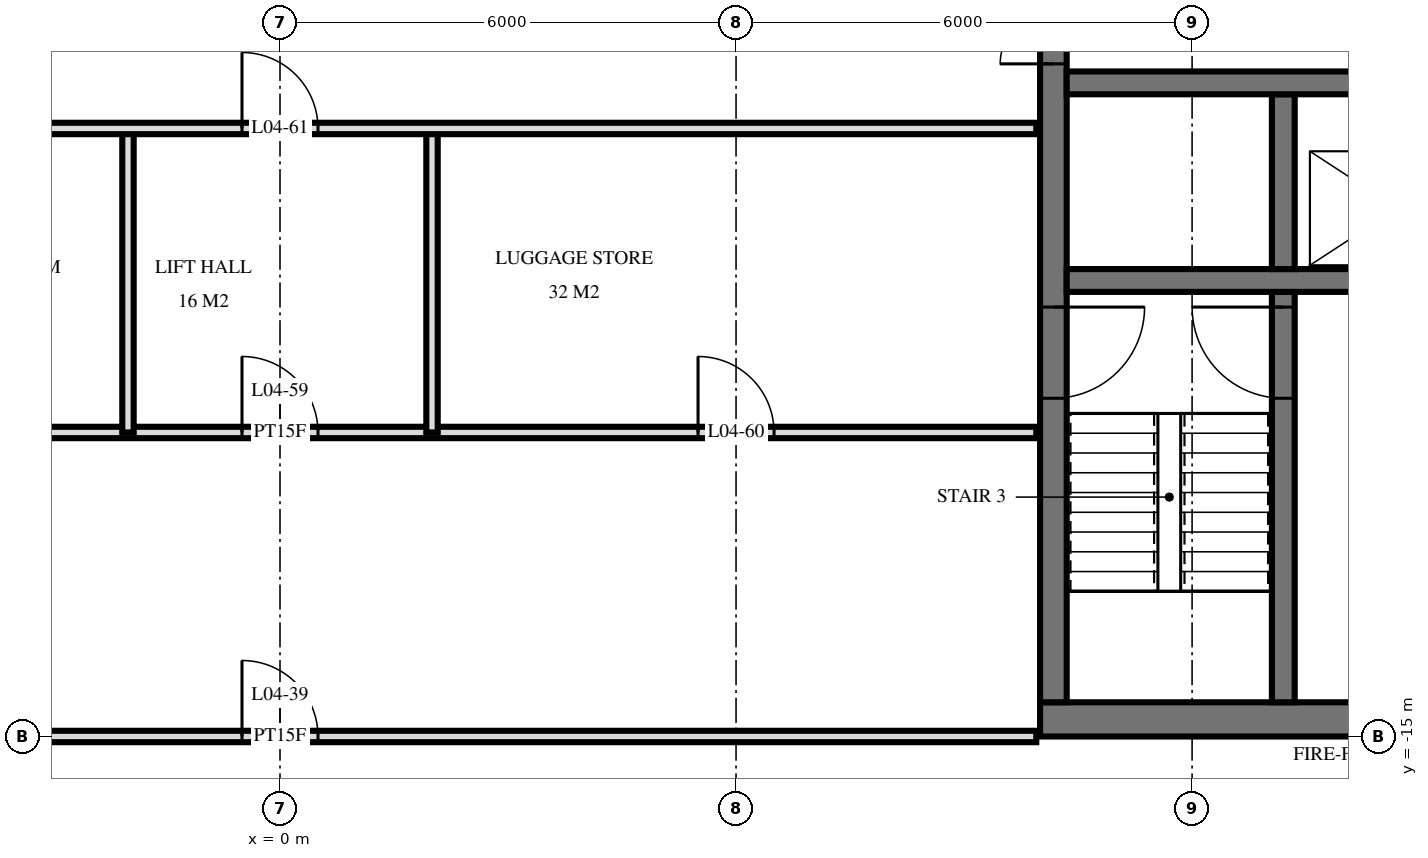
"""IFC4 building model, lengths in metres.
Left out: names, types, materials, properties, quantities, classifications, styles, units other than length and angle.
Written with IfcOpenShell. Run it as: python <this file> out.ifc"""

import sys

from ifc_helpers import new_model, si_unit, direction, frame, frame_2d, origin, place, context, subcontext, project, spatial, rectangle, extrude, element, fill, save


model = new_model("IFC4")
c1 = context("Model", 3, precision=1e-05, world=origin(), true_north=direction((0.0, 1.0)))
c2 = subcontext(c1, "Body", "Model", "MODEL_VIEW")
j1 = project(units=[si_unit("LENGTHUNIT", "METRE"), si_unit("PLANEANGLEUNIT", "RADIAN")], contexts=[c1])
p1 = place(None, origin())
s1 = spatial("IfcSite", under=j1, at=p1, CompositionType="ELEMENT")
p2 = place(p1, origin())
s2 = spatial("IfcBuilding", under=s1, at=p2, CompositionType="ELEMENT")
p3 = place(p2, frame((0.0, 0.0, 24.0)))
s3 = spatial("IfcBuildingStorey", under=s2, at=p3, CompositionType="ELEMENT", Elevation=24.0)
p4 = place(p3, frame((10.0, -14.775, 0.0), z_axis=(0.0, 0.0, 1.0), x_axis=(1.0, 0.0, 0.0)))
e1 = element("IfcWall", 1, at=p4, inside=s3, PredefinedType="SHEAR", context=c2, shape_type="SweptSolid", body=[
    extrude(rectangle(XDim=19.5, YDim=0.45, at=frame_2d((9.75, 0.0))), origin(), (0.0, 0.0, 1.0), 3.6),
])
p5 = place(p4, frame((7.1, 0.0, 0.0)))
e2 = element("IfcOpeningElement", 2, at=p5, cuts=e1, PredefinedType="OPENING", context=c2, shape_type="SweptSolid", body=[
    extrude(rectangle(XDim=1.2, YDim=2.1, at=frame_2d((0.6, 1.05))), frame((0.0, 0.235, 0.0), z_axis=(0.0, -1.0, 0.0), x_axis=(1.0, 0.0, 0.0)), (0.0, 0.0, 1.0), 0.47),
])
p6 = place(p4, frame((4.15, 0.0, 0.0)))
e3 = element("IfcOpeningElement", 3, at=p6, cuts=e1, PredefinedType="OPENING", context=c2, shape_type="SweptSolid", body=[
    extrude(rectangle(XDim=1.1, YDim=2.1, at=frame_2d((0.55, 1.05))), frame((0.0, 0.235, 0.0), z_axis=(0.0, -1.0, 0.0), x_axis=(1.0, 0.0, 0.0)), (0.0, 0.0, 1.0), 0.47),
])
p7 = place(p4, frame((10.1, 0.0, 0.0)))
e4 = element("IfcOpeningElement", 4, at=p7, cuts=e1, PredefinedType="OPENING", context=c2, shape_type="SweptSolid", body=[
    extrude(rectangle(XDim=0.9, YDim=2.1, at=frame_2d((0.45, 1.05))), frame((0.0, 0.235, 0.0), z_axis=(0.0, -1.0, 0.0), x_axis=(1.0, 0.0, 0.0)), (0.0, 0.0, 1.0), 0.47),
])
p8 = place(p4, frame((12.45, 0.0, 0.0)))
e5 = element("IfcOpeningElement", 5, at=p8, cuts=e1, PredefinedType="OPENING", context=c2, shape_type="SweptSolid", body=[
    extrude(rectangle(XDim=1.0, YDim=2.1, at=frame_2d((0.5, 1.05))), frame((0.0, 0.235, 0.0), z_axis=(0.0, -1.0, 0.0), x_axis=(1.0, 0.0, 0.0)), (0.0, 0.0, 1.0), 0.47),
])
p9 = place(p4, frame((16.25, 0.0, 0.0)))
e6 = element("IfcOpeningElement", 6, at=p9, cuts=e1, PredefinedType="OPENING", context=c2, shape_type="SweptSolid", body=[
    extrude(rectangle(XDim=1.0, YDim=2.1, at=frame_2d((0.5, 1.05))), frame((0.0, 0.235, 0.0), z_axis=(0.0, -1.0, 0.0), x_axis=(1.0, 0.0, 0.0)), (0.0, 0.0, 1.0), 0.47),
])
p10 = place(p3, frame((10.175, -14.55, 0.0), z_axis=(0.0, 0.0, 1.0), x_axis=(0.0, 1.0, 0.0)))
e7 = element("IfcWall", 7, at=p10, inside=s3, PredefinedType="SHEAR", context=c2, shape_type="SweptSolid", body=[
    extrude(rectangle(XDim=14.1, YDim=0.35, at=frame_2d((7.05, 0.0))), origin(), (0.0, 0.0, 1.0), 3.6),
])
p11 = place(p10, frame((8.4, 0.0, 0.0)))
e8 = element("IfcOpeningElement", 8, at=p11, cuts=e7, PredefinedType="OPENING", context=c2, shape_type="SweptSolid", body=[
    extrude(rectangle(XDim=1.4, YDim=2.4, at=frame_2d((0.7, 1.2))), frame((0.0, 0.185, 0.0), z_axis=(0.0, -1.0, 0.0), x_axis=(1.0, 0.0, 0.0)), (0.0, 0.0, 1.0), 0.37),
])
p12 = place(p10, frame((10.0, 0.0, 0.0)))
e9 = element("IfcOpeningElement", 9, at=p12, cuts=e7, PredefinedType="OPENING", context=c2, shape_type="SweptSolid", body=[
    extrude(rectangle(XDim=1.4, YDim=2.4, at=frame_2d((0.7, 1.2))), frame((0.0, 0.185, 0.0), z_axis=(0.0, -1.0, 0.0), x_axis=(1.0, 0.0, 0.0)), (0.0, 0.0, 1.0), 0.37),
])
p13 = place(p10, frame((4.0, 0.0, 0.0)))
e10 = element("IfcOpeningElement", 10, at=p13, cuts=e7, PredefinedType="OPENING", context=c2, shape_type="SweptSolid", body=[
    extrude(rectangle(XDim=1.2, YDim=2.1, at=frame_2d((0.6, 1.05))), frame((0.0, 0.185, 0.0), z_axis=(0.0, -1.0, 0.0), x_axis=(1.0, 0.0, 0.0)), (0.0, 0.0, 1.0), 0.37),
])
p14 = place(p3, frame((10.35, -6.4, 0.0), z_axis=(0.0, 0.0, 1.0), x_axis=(1.0, 0.0, 0.0)))
e11 = element("IfcWall", 11, at=p14, inside=s3, PredefinedType="SHEAR", context=c2, shape_type="SweptSolid", body=[
    extrude(rectangle(XDim=18.7, YDim=0.3, at=frame_2d((9.35, 0.0))), origin(), (0.0, 0.0, 1.0), 3.6),
])
p15 = place(p14, frame((14.65, 0.0, 0.0)))
e12 = element("IfcOpeningElement", 12, at=p15, cuts=e11, PredefinedType="OPENING", context=c2, shape_type="SweptSolid", body=[
    extrude(rectangle(XDim=1.1, YDim=2.1, at=frame_2d((0.55, 1.05))), frame((0.0, 0.16, 0.0), z_axis=(0.0, -1.0, 0.0), x_axis=(1.0, 0.0, 0.0)), (0.0, 0.0, 1.0), 0.32),
])
p16 = place(p14, frame((17.05, 0.0, 0.0)))
e13 = element("IfcOpeningElement", 13, at=p16, cuts=e11, PredefinedType="OPENING", context=c2, shape_type="SweptSolid", body=[
    extrude(rectangle(XDim=1.1, YDim=2.1, at=frame_2d((0.55, 1.05))), frame((0.0, 0.16, 0.0), z_axis=(0.0, -1.0, 0.0), x_axis=(1.0, 0.0, 0.0)), (0.0, 0.0, 1.0), 0.32),
])
p17 = place(p14, frame((6.8, 0.0, 0.0)))
e14 = element("IfcOpeningElement", 14, at=p17, cuts=e11, PredefinedType="OPENING", context=c2, shape_type="SweptSolid", body=[
    extrude(rectangle(XDim=1.1, YDim=2.1, at=frame_2d((0.55, 1.05))), frame((0.0, 0.16, 0.0), z_axis=(0.0, -1.0, 0.0), x_axis=(1.0, 0.0, 0.0)), (0.0, 0.0, 1.0), 0.32),
])
p18 = place(p14, frame((12.1, 0.0, 0.0)))
e15 = element("IfcOpeningElement", 15, at=p18, cuts=e11, PredefinedType="OPENING", context=c2, shape_type="SweptSolid", body=[
    extrude(rectangle(XDim=1.0, YDim=2.1, at=frame_2d((0.5, 1.05))), frame((0.0, 0.16, 0.0), z_axis=(0.0, -1.0, 0.0), x_axis=(1.0, 0.0, 0.0)), (0.0, 0.0, 1.0), 0.32),
])
p19 = place(p3, frame((10.35, -9.0, 0.0), z_axis=(0.0, 0.0, 1.0), x_axis=(1.0, 0.0, 0.0)))
e16 = element("IfcWall", 16, at=p19, inside=s3, PredefinedType="SHEAR", context=c2, shape_type="SweptSolid", body=[
    extrude(rectangle(XDim=18.7, YDim=0.3, at=frame_2d((9.35, 0.0))), origin(), (0.0, 0.0, 1.0), 3.6),
])
p20 = place(p19, frame((3.8, 0.0, 0.0)))
e17 = element("IfcOpeningElement", 17, at=p20, cuts=e16, PredefinedType="OPENING", context=c2, shape_type="SweptSolid", body=[
    extrude(rectangle(XDim=1.1, YDim=2.1, at=frame_2d((0.55, 1.05))), frame((0.0, 0.16, 0.0), z_axis=(0.0, -1.0, 0.0), x_axis=(1.0, 0.0, 0.0)), (0.0, 0.0, 1.0), 0.32),
])
p21 = place(p3, frame((13.2, -8.85, 0.0), z_axis=(0.0, 0.0, 1.0), x_axis=(0.0, 1.0, 0.0)))
e18 = element("IfcWall", 18, at=p21, inside=s3, PredefinedType="SHEAR", context=c2, shape_type="SweptSolid", body=[
    extrude(rectangle(XDim=2.3, YDim=0.3, at=frame_2d((1.15, 0.0))), origin(), (0.0, 0.0, 1.0), 3.6),
])
p22 = place(p3, frame((13.2, -14.55, 0.0), z_axis=(0.0, 0.0, 1.0), x_axis=(0.0, 1.0, 0.0)))
e19 = element("IfcWall", 19, at=p22, inside=s3, PredefinedType="SHEAR", context=c2, shape_type="SweptSolid", body=[
    extrude(rectangle(XDim=5.4, YDim=0.3, at=frame_2d((2.7, 0.0))), origin(), (0.0, 0.0, 1.0), 3.6),
])
p23 = place(p22, frame((4.0, 0.0, 0.0)))
e20 = element("IfcOpeningElement", 20, at=p23, cuts=e19, PredefinedType="OPENING", context=c2, shape_type="SweptSolid", body=[
    extrude(rectangle(XDim=1.2, YDim=2.1, at=frame_2d((0.6, 1.05))), frame((0.0, 0.16, 0.0), z_axis=(0.0, -1.0, 0.0), x_axis=(1.0, 0.0, 0.0)), (0.0, 0.0, 1.0), 0.32),
])
for number, where, z_axis, x_axis in (
    (21, (2.0, -11.0, 0.0), (0.0, 0.0, 1.0), (0.0, 1.0, 0.0)),
    (22, (-2.0, -11.0, 0.0), (0.0, 0.0, 1.0), (0.0, 1.0, 0.0)),
):
    element("IfcWall", number, at=place(p3, frame(where, z_axis=z_axis, x_axis=x_axis)), inside=s3, PredefinedType="PARTITIONING", context=c2, shape_type="SweptSolid", body=[
        extrude(rectangle(XDim=4.0, YDim=0.15, at=frame_2d((2.0, 0.0))), origin(), (0.0, 0.0, 1.0), 3.32),
    ])
p24 = place(p3, frame((-9.95, -15.0, 0.0), z_axis=(0.0, 0.0, 1.0), x_axis=(1.0, 0.0, 0.0)))
e23 = element("IfcWall", 23, at=p24, inside=s3, PredefinedType="PARTITIONING", context=c2, shape_type="SweptSolid", body=[
    extrude(rectangle(XDim=19.9, YDim=0.15, at=frame_2d((9.95, 0.0))), origin(), (0.0, 0.0, 1.0), 2.684),
])
p25 = place(p24, frame((9.45, 0.0, 0.0)))
e24 = element("IfcOpeningElement", 24, at=p25, cuts=e23, PredefinedType="OPENING", context=c2, shape_type="SweptSolid", body=[
    extrude(rectangle(XDim=1.0, YDim=2.1, at=frame_2d((0.5, 1.05))), frame((0.0, 0.085, 0.0), z_axis=(0.0, -1.0, 0.0), x_axis=(1.0, 0.0, 0.0)), (0.0, 0.0, 1.0), 0.17),
])
p26 = place(p3, frame((-9.95, -11.0, 0.0), z_axis=(0.0, 0.0, 1.0), x_axis=(1.0, 0.0, 0.0)))
e25 = element("IfcWall", 25, at=p26, inside=s3, PredefinedType="PARTITIONING", context=c2, shape_type="SweptSolid", body=[
    extrude(rectangle(XDim=19.9, YDim=0.15, at=frame_2d((9.95, 0.0))), origin(), (0.0, 0.0, 1.0), 3.32),
])
p27 = place(p26, frame((9.45, 0.0, 0.0)))
e26 = element("IfcOpeningElement", 26, at=p27, cuts=e25, PredefinedType="OPENING", context=c2, shape_type="SweptSolid", body=[
    extrude(rectangle(XDim=1.0, YDim=2.1, at=frame_2d((0.5, 1.05))), frame((0.0, 0.085, 0.0), z_axis=(0.0, -1.0, 0.0), x_axis=(1.0, 0.0, 0.0)), (0.0, 0.0, 1.0), 0.17),
])
p28 = place(p26, frame((15.45, 0.0, 0.0)))
e27 = element("IfcOpeningElement", 27, at=p28, cuts=e25, PredefinedType="OPENING", context=c2, shape_type="SweptSolid", body=[
    extrude(rectangle(XDim=1.0, YDim=2.1, at=frame_2d((0.5, 1.05))), frame((0.0, 0.085, 0.0), z_axis=(0.0, -1.0, 0.0), x_axis=(1.0, 0.0, 0.0)), (0.0, 0.0, 1.0), 0.17),
])
p29 = place(p3, frame((-9.95, -7.0, 0.0), z_axis=(0.0, 0.0, 1.0), x_axis=(1.0, 0.0, 0.0)))
e28 = element("IfcWall", 28, at=p29, inside=s3, PredefinedType="PARTITIONING", context=c2, shape_type="SweptSolid", body=[
    extrude(rectangle(XDim=19.9, YDim=0.15, at=frame_2d((9.95, 0.0))), origin(), (0.0, 0.0, 1.0), 3.32),
])
p30 = place(p29, frame((9.45, 0.0, 0.0)))
e29 = element("IfcOpeningElement", 29, at=p30, cuts=e28, PredefinedType="OPENING", context=c2, shape_type="SweptSolid", body=[
    extrude(rectangle(XDim=1.0, YDim=2.1, at=frame_2d((0.5, 1.05))), frame((0.0, 0.085, 0.0), z_axis=(0.0, -1.0, 0.0), x_axis=(1.0, 0.0, 0.0)), (0.0, 0.0, 1.0), 0.17),
])
p31 = place(p29, frame((3.45, 0.0, 0.0)))
e30 = element("IfcOpeningElement", 30, at=p31, cuts=e28, PredefinedType="OPENING", context=c2, shape_type="SweptSolid", body=[
    extrude(rectangle(XDim=1.0, YDim=2.1, at=frame_2d((0.5, 1.05))), frame((0.0, 0.085, 0.0), z_axis=(0.0, -1.0, 0.0), x_axis=(1.0, 0.0, 0.0)), (0.0, 0.0, 1.0), 0.17),
])
p32 = place(p11, origin())
e31 = element("IfcDoor", 31, at=p32, inside=s3, OperationType="DOUBLE_DOOR_SINGLE_SWING", PredefinedType="DOOR", context=c2, shape_type="SweptSolid", body=[
    extrude(rectangle(XDim=1.4, YDim=2.4, at=frame_2d((0.7, 1.2))), frame((0.0, 0.025, 0.0), z_axis=(0.0, -1.0, 0.0), x_axis=(1.0, 0.0, 0.0)), (0.0, 0.0, 1.0), 0.05),
])
fill(e8, e31)
p33 = place(p13, frame((0.6, 0.0, 0.0), z_axis=(0.0, 0.0, 1.0), x_axis=(-1.0, 0.0, 0.0)))
e32 = element("IfcDoor", 32, at=p33, inside=s3, OperationType="SINGLE_SWING_RIGHT", PredefinedType="DOOR", context=c2, shape_type="SweptSolid", body=[
    extrude(rectangle(XDim=1.2, YDim=2.1, at=frame_2d((0.0, 1.05))), frame((0.0, -0.025, 0.0), z_axis=(0.0, 1.0, 0.0), x_axis=(-1.0, 0.0, 0.0)), (0.0, 0.0, 1.0), 0.05),
])
fill(e10, e32)
p34 = place(p23, origin())
e33 = element("IfcDoor", 33, at=p34, inside=s3, OperationType="SINGLE_SWING_LEFT", PredefinedType="DOOR", context=c2, shape_type="SweptSolid", body=[
    extrude(rectangle(XDim=1.2, YDim=2.1, at=frame_2d((0.6, 1.05))), frame((0.0, 0.025, 0.0), z_axis=(0.0, -1.0, 0.0), x_axis=(1.0, 0.0, 0.0)), (0.0, 0.0, 1.0), 0.05),
])
fill(e20, e33)
p35 = place(p25, origin())
e34 = element("IfcDoor", 34, at=p35, inside=s3, OperationType="SINGLE_SWING_RIGHT", PredefinedType="DOOR", context=c2, shape_type="SweptSolid", body=[
    extrude(rectangle(XDim=1.0, YDim=2.1, at=frame_2d((0.5, 1.05))), frame((0.0, 0.025, 0.0), z_axis=(0.0, -1.0, 0.0), x_axis=(1.0, 0.0, 0.0)), (0.0, 0.0, 1.0), 0.05),
])
fill(e24, e34)
p36 = place(p27, origin())
e35 = element("IfcDoor", 35, at=p36, inside=s3, OperationType="SINGLE_SWING_RIGHT", PredefinedType="DOOR", context=c2, shape_type="SweptSolid", body=[
    extrude(rectangle(XDim=1.0, YDim=2.1, at=frame_2d((0.5, 1.05))), frame((0.0, 0.025, 0.0), z_axis=(0.0, -1.0, 0.0), x_axis=(1.0, 0.0, 0.0)), (0.0, 0.0, 1.0), 0.05),
])
fill(e26, e35)
p37 = place(p28, origin())
e36 = element("IfcDoor", 36, at=p37, inside=s3, OperationType="SINGLE_SWING_RIGHT", PredefinedType="DOOR", context=c2, shape_type="SweptSolid", body=[
    extrude(rectangle(XDim=1.0, YDim=2.1, at=frame_2d((0.5, 1.05))), frame((0.0, 0.025, 0.0), z_axis=(0.0, -1.0, 0.0), x_axis=(1.0, 0.0, 0.0)), (0.0, 0.0, 1.0), 0.05),
])
fill(e27, e36)
p38 = place(p30, origin())
e37 = element("IfcDoor", 37, at=p38, inside=s3, OperationType="SINGLE_SWING_RIGHT", PredefinedType="DOOR", context=c2, shape_type="SweptSolid", body=[
    extrude(rectangle(XDim=1.0, YDim=2.1, at=frame_2d((0.5, 1.05))), frame((0.0, 0.025, 0.0), z_axis=(0.0, -1.0, 0.0), x_axis=(1.0, 0.0, 0.0)), (0.0, 0.0, 1.0), 0.05),
])
fill(e29, e37)
save(model, sys.argv[1])
